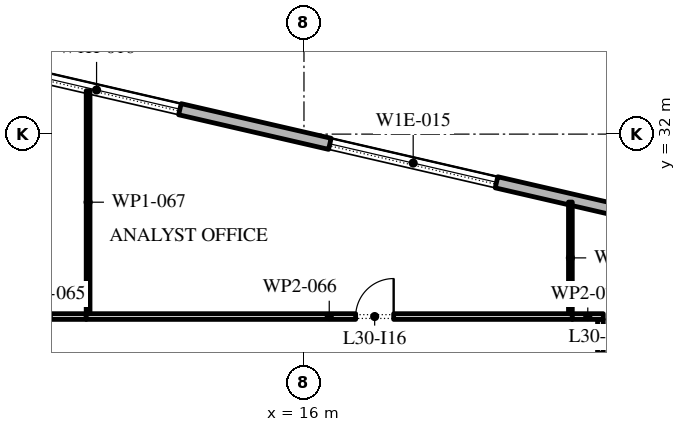
"""IFC4 building model, lengths in metres.
Left out: names, types, materials, properties, quantities, classifications, styles, units other than length and angle.
Written with IfcOpenShell. Run it as: python <this file> out.ifc"""

import sys

from ifc_helpers import new_model, si_unit, direction, frame, frame_2d, origin, place, context, subcontext, project, spatial, rectangle, extrude, element, fill, save


model = new_model("IFC4")
c1 = context("Model", 3, precision=1e-05, world=origin(), true_north=direction((0.0, 1.0)))
c2 = subcontext(c1, "Body", "Model", "MODEL_VIEW")
j1 = project(units=[si_unit("LENGTHUNIT", "METRE"), si_unit("PLANEANGLEUNIT", "RADIAN")], contexts=[c1])
p1 = place(None, origin())
s1 = spatial("IfcSite", under=j1, at=p1, CompositionType="ELEMENT")
p2 = place(p1, origin())
s2 = spatial("IfcBuilding", under=s1, at=p2, CompositionType="ELEMENT")
p3 = place(p2, frame((0.0, 0.0, 139.2)))
s3 = spatial("IfcBuildingStorey", under=s2, at=p3, CompositionType="ELEMENT", Elevation=139.2)
p4 = place(p3, frame((31.078, 28.421, 0.0), z_axis=(0.0, 0.0, 1.0), x_axis=(-0.974370456532, 0.224949357493, 0.0)))
e1 = element("IfcWall", 1, at=p4, inside=s3, PredefinedType="STANDARD", context=c2, shape_type="SweptSolid", body=[
    extrude(rectangle(XDim=51.0, YDim=0.3, at=frame_2d((25.5, 0.0))), origin(), (0.0, 0.0, 1.0), 4.0),
])
p5 = place(p4, frame((1.875, 0.0, 0.45)))
e2 = element("IfcOpeningElement", 2, at=p5, cuts=e1, PredefinedType="OPENING", context=c2, shape_type="SweptSolid", body=[
    extrude(rectangle(XDim=4.5, YDim=2.875, at=frame_2d((2.25, 1.438))), frame((0.0, 0.16, 0.0), z_axis=(0.0, -1.0, 0.0), x_axis=(1.0, 0.0, 0.0)), (0.0, 0.0, 1.0), 0.32),
])
p6 = place(p4, frame((10.275, 0.0, 0.45)))
e3 = element("IfcOpeningElement", 3, at=p6, cuts=e1, PredefinedType="OPENING", context=c2, shape_type="SweptSolid", body=[
    extrude(rectangle(XDim=4.5, YDim=2.825, at=frame_2d((2.25, 1.413))), frame((0.0, 0.16, 0.0), z_axis=(0.0, -1.0, 0.0), x_axis=(1.0, 0.0, 0.0)), (0.0, 0.0, 1.0), 0.32),
])
p7 = place(p4, frame((18.825, 0.0, 0.45)))
e4 = element("IfcOpeningElement", 4, at=p7, cuts=e1, PredefinedType="OPENING", context=c2, shape_type="SweptSolid", body=[
    extrude(rectangle(XDim=4.5, YDim=2.75, at=frame_2d((2.25, 1.375))), frame((0.0, 0.16, 0.0), z_axis=(0.0, -1.0, 0.0), x_axis=(1.0, 0.0, 0.0)), (0.0, 0.0, 1.0), 0.32),
])
p8 = place(p4, frame((27.075, 0.0, 0.0)))
e5 = element("IfcOpeningElement", 5, at=p8, cuts=e1, PredefinedType="OPENING", context=c2, shape_type="SweptSolid", body=[
    extrude(rectangle(XDim=2.4, YDim=3.125, at=frame_2d((1.2, 1.562))), frame((0.0, 0.16, 0.0), z_axis=(0.0, -1.0, 0.0), x_axis=(1.0, 0.0, 0.0)), (0.0, 0.0, 1.0), 0.32),
])
p9 = place(p4, frame((35.925, 0.0, 0.45)))
e6 = element("IfcOpeningElement", 6, at=p9, cuts=e1, PredefinedType="OPENING", context=c2, shape_type="SweptSolid", body=[
    extrude(rectangle(XDim=4.5, YDim=2.525, at=frame_2d((2.25, 1.262))), frame((0.0, 0.16, 0.0), z_axis=(0.0, -1.0, 0.0), x_axis=(1.0, 0.0, 0.0)), (0.0, 0.0, 1.0), 0.32),
])
p10 = place(p4, frame((44.475, 0.0, 0.45)))
e7 = element("IfcOpeningElement", 7, at=p10, cuts=e1, PredefinedType="OPENING", context=c2, shape_type="SweptSolid", body=[
    extrude(rectangle(XDim=4.5, YDim=2.45, at=frame_2d((2.25, 1.225))), frame((0.0, 0.16, 0.0), z_axis=(0.0, -1.0, 0.0), x_axis=(1.0, 0.0, 0.0)), (0.0, 0.0, 1.0), 0.32),
])
p11 = place(p3, frame((8.275, 27.2, 0.0), z_axis=(0.0, 0.0, 1.0), x_axis=(1.0, 0.0, 0.0)))
e8 = element("IfcWall", 8, at=p11, inside=s3, PredefinedType="PARTITIONING", context=c2, shape_type="SweptSolid", body=[
    extrude(rectangle(XDim=1.995, YDim=0.15, at=frame_2d((0.998, 0.0))), origin(), (0.0, 0.0, 1.0), 4.0),
])
p12 = place(p3, frame((10.27, 27.2, 0.0), z_axis=(0.0, 0.0, 1.0), x_axis=(1.0, 0.0, 0.0)))
e9 = element("IfcWall", 9, at=p12, inside=s3, PredefinedType="PARTITIONING", context=c2, shape_type="SweptSolid", body=[
    extrude(rectangle(XDim=12.79, YDim=0.15, at=frame_2d((6.395, 0.0))), origin(), (0.0, 0.0, 1.0), 4.0),
])
p13 = place(p12, frame((7.09, 0.0, 0.0)))
e10 = element("IfcOpeningElement", 10, at=p13, cuts=e9, PredefinedType="OPENING", context=c2, shape_type="SweptSolid", body=[
    extrude(rectangle(XDim=1.0, YDim=2.1, at=frame_2d((0.5, 1.05))), frame((0.0, 0.085, 0.0), z_axis=(0.0, -1.0, 0.0), x_axis=(1.0, 0.0, 0.0)), (0.0, 0.0, 1.0), 0.17),
])
p14 = place(p3, frame((10.32, 33.142, 0.0), z_axis=(0.0, 0.0, 1.0), x_axis=(0.0, -1.0, 0.0)))
e11 = element("IfcWall", 11, at=p14, inside=s3, PredefinedType="PARTITIONING", context=c2, shape_type="SweptSolid", body=[
    extrude(rectangle(XDim=5.867, YDim=0.1, at=frame_2d((2.934, 0.0))), origin(), (0.0, 0.0, 1.0), 4.0),
])
p15 = place(p3, frame((23.06, 27.2, 0.0), z_axis=(0.0, 0.0, 1.0), x_axis=(1.0, 0.0, 0.0)))
e12 = element("IfcWall", 12, at=p15, inside=s3, PredefinedType="PARTITIONING", context=c2, shape_type="SweptSolid", body=[
    extrude(rectangle(XDim=0.815, YDim=0.15, at=frame_2d((0.407, 0.0))), origin(), (0.0, 0.0, 1.0), 4.0),
])
p16 = place(p3, frame((23.01, 30.212, 0.0), z_axis=(0.0, 0.0, 1.0), x_axis=(0.0, -1.0, 0.0)))
e13 = element("IfcWall", 13, at=p16, inside=s3, PredefinedType="PARTITIONING", context=c2, shape_type="SweptSolid", body=[
    extrude(rectangle(XDim=2.937, YDim=0.1, at=frame_2d((1.469, 0.0))), origin(), (0.0, 0.0, 1.0), 4.0),
])
p17 = place(p3, frame((23.8, 27.125, 0.0), z_axis=(0.0, 0.0, 1.0), x_axis=(0.0, -1.0, 0.0)))
e14 = element("IfcWall", 14, at=p17, inside=s3, PredefinedType="PARTITIONING", context=c2, shape_type="SweptSolid", body=[
    extrude(rectangle(XDim=3.665, YDim=0.15, at=frame_2d((1.833, 0.0))), origin(), (0.0, 0.0, 1.0), 4.0),
])
p18 = place(p17, frame((1.065, 0.0, 0.0)))
e15 = element("IfcOpeningElement", 15, at=p18, cuts=e14, PredefinedType="OPENING", context=c2, shape_type="SweptSolid", body=[
    extrude(rectangle(XDim=1.0, YDim=2.1, at=frame_2d((0.5, 1.05))), frame((0.0, 0.085, 0.0), z_axis=(0.0, -1.0, 0.0), x_axis=(1.0, 0.0, 0.0)), (0.0, 0.0, 1.0), 0.17),
])
p19 = place(p6, origin())
e16 = element("IfcWindow", 16, at=p19, inside=s3, PartitioningType="DOUBLE_PANEL_VERTICAL", PredefinedType="WINDOW", context=c2, shape_type="SweptSolid", body=[
    extrude(rectangle(XDim=4.5, YDim=2.825, at=frame_2d((2.25, 1.413))), frame((0.0, 0.03, 0.0), z_axis=(0.0, -1.0, 0.0), x_axis=(1.0, 0.0, 0.0)), (0.0, 0.0, 1.0), 0.06),
])
fill(e3, e16)
p20 = place(p7, origin())
e17 = element("IfcWindow", 17, at=p20, inside=s3, PartitioningType="DOUBLE_PANEL_VERTICAL", PredefinedType="WINDOW", context=c2, shape_type="SweptSolid", body=[
    extrude(rectangle(XDim=4.5, YDim=2.75, at=frame_2d((2.25, 1.375))), frame((0.0, 0.03, 0.0), z_axis=(0.0, -1.0, 0.0), x_axis=(1.0, 0.0, 0.0)), (0.0, 0.0, 1.0), 0.06),
])
fill(e4, e17)
p21 = place(p13, origin())
e18 = element("IfcDoor", 18, at=p21, inside=s3, OperationType="SINGLE_SWING_LEFT", PredefinedType="DOOR", context=c2, shape_type="SweptSolid", body=[
    extrude(rectangle(XDim=1.0, YDim=2.1, at=frame_2d((0.5, 1.05))), frame((0.0, 0.025, 0.0), z_axis=(0.0, -1.0, 0.0), x_axis=(1.0, 0.0, 0.0)), (0.0, 0.0, 1.0), 0.05),
])
fill(e10, e18)
save(model, sys.argv[1])
